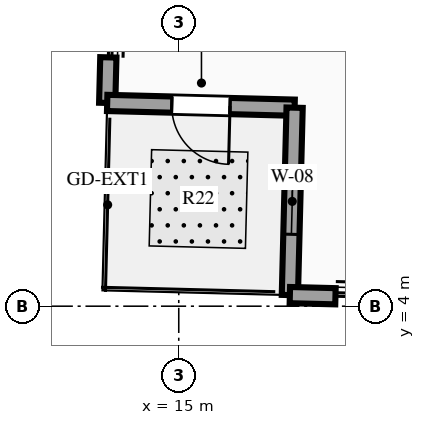
"""IFC4 building model, lengths in metres.
Left out: names, types, materials, properties, quantities, classifications, styles, units other than length and angle.
Written with IfcOpenShell. Run it as: python <this file> out.ifc"""

import sys

from ifc_helpers import new_model, si_unit, direction, frame, frame_2d, origin, place, context, subcontext, project, spatial, rectangle, extrude, element, fill, save


model = new_model("IFC4")
c1 = context("Model", 3, precision=1e-05, world=origin(), true_north=direction((0.0, 1.0)))
c2 = subcontext(c1, "Body", "Model", "MODEL_VIEW")
j1 = project(units=[si_unit("LENGTHUNIT", "METRE"), si_unit("PLANEANGLEUNIT", "RADIAN")], contexts=[c1])
p1 = place(None, origin())
s1 = spatial("IfcSite", under=j1, at=p1, CompositionType="ELEMENT")
p2 = place(p1, origin())
s2 = spatial("IfcBuilding", under=s1, at=p2, CompositionType="ELEMENT")
p3 = place(p2, frame((0.0, 0.0, 325.2)))
s3 = spatial("IfcBuildingStorey", under=s2, at=p3, CompositionType="ELEMENT", Elevation=325.2)
p4 = place(p3, frame((13.588, 8.011, 0.0), z_axis=(0.0, 0.0, 1.0), x_axis=(0.025229415726, 0.99968168763, 0.0)))
e1 = element("IfcWall", 1, at=p4, inside=s3, PredefinedType="STANDARD", context=c2, shape_type="SweptSolid", body=[
    extrude(rectangle(XDim=0.9, YDim=0.32, at=frame_2d((0.45, 0.0))), origin(), (0.0, 0.0, 1.0), 3.49),
])
p5 = place(p3, frame((17.286, 7.918, 0.0), z_axis=(0.0, 0.0, 1.0), x_axis=(-0.999678931284, 0.025338396674, 0.0)))
e2 = element("IfcWall", 2, at=p5, inside=s3, PredefinedType="STANDARD", context=c2, shape_type="SweptSolid", body=[
    extrude(rectangle(XDim=3.7, YDim=0.32, at=frame_2d((1.85, 0.0))), origin(), (0.0, 0.0, 1.0), 3.49),
])
p6 = place(p5, frame((1.275, 0.0, 0.0)))
e3 = element("IfcOpeningElement", 3, at=p6, cuts=e2, PredefinedType="OPENING", context=c2, shape_type="SweptSolid", body=[
    extrude(rectangle(XDim=1.15, YDim=2.2, at=frame_2d((0.575, 1.1))), frame((0.0, 0.17, 0.0), z_axis=(0.0, -1.0, 0.0), x_axis=(1.0, 0.0, 0.0)), (0.0, 0.0, 1.0), 0.34),
])
p7 = place(p3, frame((17.193, 4.219, 0.0), z_axis=(0.0, 0.0, 1.0), x_axis=(0.025272453466, 0.99968060054, 0.0)))
e4 = element("IfcWall", 4, at=p7, inside=s3, PredefinedType="STANDARD", context=c2, shape_type="SweptSolid", body=[
    extrude(rectangle(XDim=3.7, YDim=0.32, at=frame_2d((1.85, 0.0))), origin(), (0.0, 0.0, 1.0), 3.49),
])
p8 = place(p7, frame((1.2, 0.0, 0.85)))
e5 = element("IfcOpeningElement", 5, at=p8, cuts=e4, PredefinedType="OPENING", context=c2, shape_type="SweptSolid", body=[
    extrude(rectangle(XDim=1.3, YDim=1.9, at=frame_2d((0.65, 0.95))), frame((0.0, 0.17, 0.0), z_axis=(0.0, -1.0, 0.0), x_axis=(1.0, 0.0, 0.0)), (0.0, 0.0, 1.0), 0.34),
])
p9 = place(p3, frame((18.093, 4.196, 0.0), z_axis=(0.0, 0.0, 1.0), x_axis=(-0.999674808756, 0.025500524294, 0.0)))
e6 = element("IfcWall", 6, at=p9, inside=s3, PredefinedType="STANDARD", context=c2, shape_type="SweptSolid", body=[
    extrude(rectangle(XDim=0.9, YDim=0.32, at=frame_2d((0.45, 0.0))), origin(), (0.0, 0.0, 1.0), 3.49),
])
p10 = place(p6, origin())
e7 = element("IfcDoor", 7, at=p10, inside=s3, OperationType="SINGLE_SWING_LEFT", PredefinedType="DOOR", context=c2, shape_type="SweptSolid", body=[
    extrude(rectangle(XDim=1.15, YDim=2.2, at=frame_2d((0.575, 1.1))), frame((0.0, 0.025, 0.0), z_axis=(0.0, -1.0, 0.0), x_axis=(1.0, 0.0, 0.0)), (0.0, 0.0, 1.0), 0.05),
])
fill(e3, e7)
p11 = place(p8, origin())
e8 = element("IfcWindow", 8, at=p11, inside=s3, PartitioningType="SINGLE_PANEL", PredefinedType="WINDOW", context=c2, shape_type="SweptSolid", body=[
    extrude(rectangle(XDim=1.3, YDim=1.9, at=frame_2d((0.65, 0.95))), frame((0.0, 0.03, 0.0), z_axis=(0.0, -1.0, 0.0), x_axis=(1.0, 0.0, 0.0)), (0.0, 0.0, 1.0), 0.06),
])
fill(e5, e8)
save(model, sys.argv[1])
